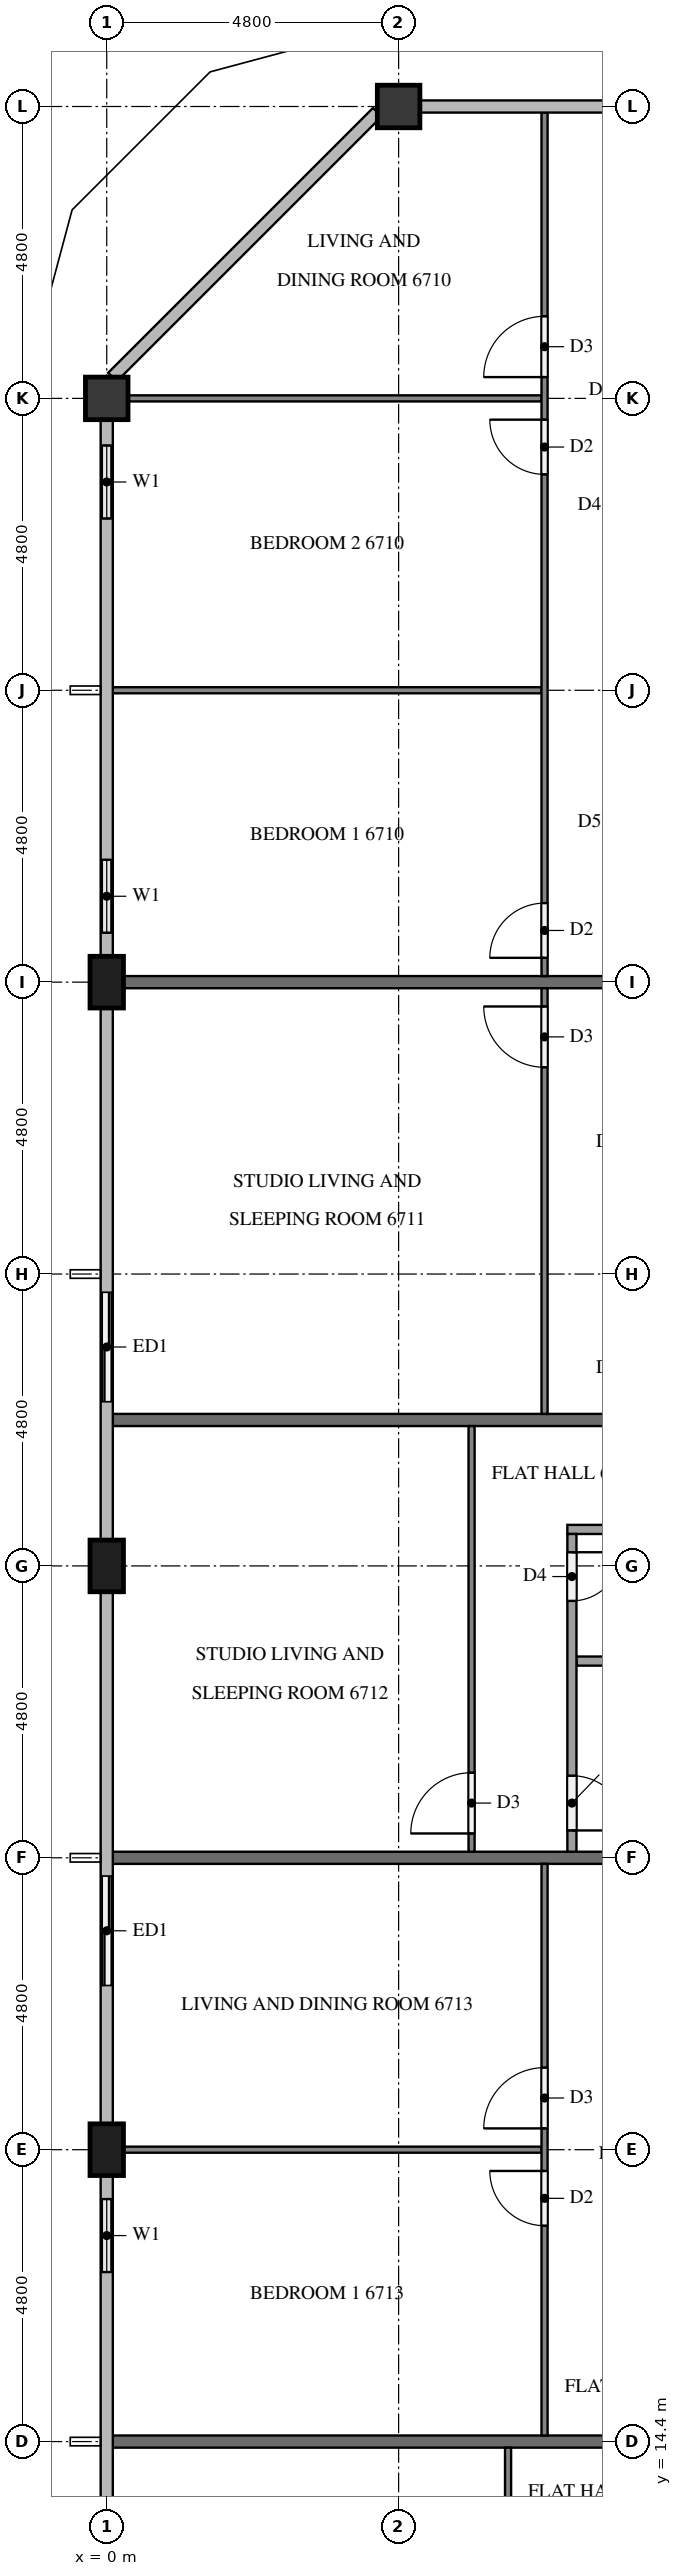
"""IFC4 building model, lengths in metres.
Left out: names, types, materials, properties, quantities, classifications, styles, units other than length and angle.
Written with IfcOpenShell. Run it as: python <this file> out.ifc"""

import sys

from ifc_helpers import new_model, si_unit, direction, frame, frame_2d, origin, origin_2d, place, context, subcontext, project, spatial, rectangle, extrude, element, fill, save


model = new_model("IFC4")
c1 = context("Model", 3, precision=1e-05, world=origin(), true_north=direction((0.0, 1.0)))
c2 = subcontext(c1, "Body", "Model", "MODEL_VIEW")
j1 = project(units=[si_unit("LENGTHUNIT", "METRE"), si_unit("PLANEANGLEUNIT", "RADIAN")], contexts=[c1])
p1 = place(None, origin())
s1 = spatial("IfcSite", under=j1, at=p1, CompositionType="ELEMENT")
p2 = place(p1, origin())
s2 = spatial("IfcBuilding", under=s1, at=p2, CompositionType="ELEMENT")
p3 = place(p2, frame((0.0, 0.0, 256.2)))
s3 = spatial("IfcBuildingStorey", under=s2, at=p3, CompositionType="ELEMENT", Elevation=256.2)
for number, where, z_axis, x_axis in (
    (1, (4.8, 52.8, 0.0), (0.0, 0.0, 1.0), (1.0, 0.0, 0.0)),
    (2, (0.0, 48.0, 0.0), (0.0, 0.0, 1.0), (1.0, 0.0, 0.0)),
):
    element("IfcColumn", number, at=place(p3, frame(where, z_axis=z_axis, x_axis=x_axis)), inside=s3, PredefinedType="COLUMN", context=c2, shape_type="SweptSolid", body=[
        extrude(rectangle(XDim=0.7, YDim=0.7, at=origin_2d()), origin(), (0.0, 0.0, 1.0), 3.2),
    ])
for number, where, z_axis, x_axis in (
    (3, (0.0, 38.4, 0.0), (0.0, 0.0, 1.0), (0.0, 1.0, 0.0)),
    (4, (0.0, 28.8, 0.0), (0.0, 0.0, 1.0), (0.0, 1.0, 0.0)),
    (5, (0.0, 19.2, 0.0), (0.0, 0.0, 1.0), (0.0, 1.0, 0.0)),
):
    element("IfcColumn", number, at=place(p3, frame(where, z_axis=z_axis, x_axis=x_axis)), inside=s3, PredefinedType="COLUMN", context=c2, shape_type="SweptSolid", body=[
        extrude(rectangle(XDim=0.85, YDim=0.55, at=origin_2d()), origin(), (0.0, 0.0, 1.0), 3.2),
    ])
p4 = place(p3, frame((0.0, 47.65, 0.0), z_axis=(0.0, 0.0, 1.0), x_axis=(0.0, -1.0, 0.0)))
e6 = element("IfcWall", 6, at=p4, inside=s3, PredefinedType="SOLIDWALL", context=c2, shape_type="SweptSolid", body=[
    extrude(rectangle(XDim=2.05, YDim=0.15, at=frame_2d((1.025, 0.0))), origin(), (0.0, 0.0, 1.0), 3.2),
])
p5 = place(p4, frame((0.425, 0.0, 0.9)))
e7 = element("IfcOpeningElement", 7, at=p5, cuts=e6, PredefinedType="OPENING", context=c2, shape_type="SweptSolid", body=[
    extrude(rectangle(XDim=1.2, YDim=1.4, at=frame_2d((0.6, 0.7))), frame((0.0, 0.085, 0.0), z_axis=(0.0, -1.0, 0.0), x_axis=(1.0, 0.0, 0.0)), (0.0, 0.0, 1.0), 0.17),
])
p6 = place(p3, frame((0.0, 40.8, 0.0), z_axis=(0.0, 0.0, 1.0), x_axis=(0.0, -1.0, 0.0)))
e8 = element("IfcWall", 8, at=p6, inside=s3, PredefinedType="SOLIDWALL", context=c2, shape_type="SweptSolid", body=[
    extrude(rectangle(XDim=1.975, YDim=0.15, at=frame_2d((0.988, 0.0))), origin(), (0.0, 0.0, 1.0), 3.2),
])
p7 = place(p6, frame((0.387, 0.0, 0.9)))
e9 = element("IfcOpeningElement", 9, at=p7, cuts=e8, PredefinedType="OPENING", context=c2, shape_type="SweptSolid", body=[
    extrude(rectangle(XDim=1.2, YDim=1.4, at=frame_2d((0.6, 0.7))), frame((0.0, 0.085, 0.0), z_axis=(0.0, -1.0, 0.0), x_axis=(1.0, 0.0, 0.0)), (0.0, 0.0, 1.0), 0.17),
])
p8 = place(p3, frame((0.0, 33.6, 0.0), z_axis=(0.0, 0.0, 1.0), x_axis=(0.0, -1.0, 0.0)))
e10 = element("IfcWall", 10, at=p8, inside=s3, PredefinedType="SOLIDWALL", context=c2, shape_type="SweptSolid", body=[
    extrude(rectangle(XDim=2.4, YDim=0.15, at=frame_2d((1.2, 0.0))), origin(), (0.0, 0.0, 1.0), 3.2),
])
p9 = place(p8, frame((0.3, 0.0, 0.0)))
e11 = element("IfcOpeningElement", 11, at=p9, cuts=e10, PredefinedType="OPENING", context=c2, shape_type="SweptSolid", body=[
    extrude(rectangle(XDim=1.8, YDim=2.4, at=frame_2d((0.9, 1.2))), frame((0.0, 0.085, 0.0), z_axis=(0.0, -1.0, 0.0), x_axis=(1.0, 0.0, 0.0)), (0.0, 0.0, 1.0), 0.17),
])
p10 = place(p3, frame((0.0, 24.0, 0.0), z_axis=(0.0, 0.0, 1.0), x_axis=(0.0, -1.0, 0.0)))
e12 = element("IfcWall", 12, at=p10, inside=s3, PredefinedType="SOLIDWALL", context=c2, shape_type="SweptSolid", body=[
    extrude(rectangle(XDim=2.4, YDim=0.15, at=frame_2d((1.2, 0.0))), origin(), (0.0, 0.0, 1.0), 3.2),
])
p11 = place(p10, frame((0.3, 0.0, 0.0)))
e13 = element("IfcOpeningElement", 13, at=p11, cuts=e12, PredefinedType="OPENING", context=c2, shape_type="SweptSolid", body=[
    extrude(rectangle(XDim=1.8, YDim=2.4, at=frame_2d((0.9, 1.2))), frame((0.0, 0.085, 0.0), z_axis=(0.0, -1.0, 0.0), x_axis=(1.0, 0.0, 0.0)), (0.0, 0.0, 1.0), 0.17),
])
p12 = place(p3, frame((0.0, 18.775, 0.0), z_axis=(0.0, 0.0, 1.0), x_axis=(0.0, -1.0, 0.0)))
e14 = element("IfcWall", 14, at=p12, inside=s3, PredefinedType="SOLIDWALL", context=c2, shape_type="SweptSolid", body=[
    extrude(rectangle(XDim=1.975, YDim=0.15, at=frame_2d((0.987, 0.0))), origin(), (0.0, 0.0, 1.0), 3.2),
])
p13 = place(p12, frame((0.387, 0.0, 0.9)))
e15 = element("IfcOpeningElement", 15, at=p13, cuts=e14, PredefinedType="OPENING", context=c2, shape_type="SweptSolid", body=[
    extrude(rectangle(XDim=1.2, YDim=1.4, at=frame_2d((0.6, 0.7))), frame((0.0, 0.085, 0.0), z_axis=(0.0, -1.0, 0.0), x_axis=(1.0, 0.0, 0.0)), (0.0, 0.0, 1.0), 0.17),
])
p14 = place(p3, frame((0.275, 38.4, 0.0), z_axis=(0.0, 0.0, 1.0), x_axis=(1.0, 0.0, 0.0)))
e16 = element("IfcWall", 16, at=p14, inside=s3, PredefinedType="PARTITIONING", context=c2, shape_type="SweptSolid", body=[
    extrude(rectangle(XDim=11.625, YDim=0.2, at=frame_2d((5.812, 0.0))), origin(), (0.0, 0.0, 1.0), 3.2),
])
for number, where, z_axis, x_axis in (
    (17, (0.1, 31.2, 0.0), (0.0, 0.0, 1.0), (1.0, 0.0, 0.0)),
    (18, (0.1, 24.0, 0.0), (0.0, 0.0, 1.0), (1.0, 0.0, 0.0)),
    (19, (0.1, 14.4, 0.0), (0.0, 0.0, 1.0), (1.0, 0.0, 0.0)),
):
    element("IfcWall", number, at=place(p3, frame(where, z_axis=z_axis, x_axis=x_axis)), inside=s3, PredefinedType="PARTITIONING", context=c2, shape_type="SweptSolid", body=[
        extrude(rectangle(XDim=11.8, YDim=0.2, at=frame_2d((5.9, 0.0))), origin(), (0.0, 0.0, 1.0), 3.2),
    ])
p15 = place(p3, frame((7.15, 43.2, 0.0), z_axis=(0.0, 0.0, 1.0), x_axis=(-1.0, 0.0, 0.0)))
e20 = element("IfcWall", 20, at=p15, inside=s3, PredefinedType="PARTITIONING", context=c2, shape_type="SweptSolid", body=[
    extrude(rectangle(XDim=7.05, YDim=0.1, at=frame_2d((3.525, 0.0))), origin(), (0.0, 0.0, 1.0), 3.2),
])
p16 = place(p3, frame((7.15, 48.0, 0.0), z_axis=(0.0, 0.0, 1.0), x_axis=(-1.0, 0.0, 0.0)))
e21 = element("IfcWall", 21, at=p16, inside=s3, PredefinedType="PARTITIONING", context=c2, shape_type="SweptSolid", body=[
    extrude(rectangle(XDim=6.8, YDim=0.1, at=frame_2d((3.4, 0.0))), origin(), (0.0, 0.0, 1.0), 3.2),
])
p17 = place(p3, frame((7.2, 38.5, 0.0), z_axis=(0.0, 0.0, 1.0), x_axis=(0.0, 1.0, 0.0)))
e22 = element("IfcWall", 22, at=p17, inside=s3, PredefinedType="PARTITIONING", context=c2, shape_type="SweptSolid", body=[
    extrude(rectangle(XDim=14.2, YDim=0.1, at=frame_2d((7.1, 0.0))), origin(), (0.0, 0.0, 1.0), 3.2),
])
p18 = place(p17, frame((0.3, 0.0, 0.0)))
e23 = element("IfcOpeningElement", 23, at=p18, cuts=e22, PredefinedType="OPENING", context=c2, shape_type="SweptSolid", body=[
    extrude(rectangle(XDim=0.9, YDim=2.1, at=frame_2d((0.45, 1.05))), frame((0.0, 0.06, 0.0), z_axis=(0.0, -1.0, 0.0), x_axis=(1.0, 0.0, 0.0)), (0.0, 0.0, 1.0), 0.12),
])
p19 = place(p17, frame((8.25, 0.0, 0.0)))
e24 = element("IfcOpeningElement", 24, at=p19, cuts=e22, PredefinedType="OPENING", context=c2, shape_type="SweptSolid", body=[
    extrude(rectangle(XDim=0.9, YDim=2.1, at=frame_2d((0.45, 1.05))), frame((0.0, 0.06, 0.0), z_axis=(0.0, -1.0, 0.0), x_axis=(1.0, 0.0, 0.0)), (0.0, 0.0, 1.0), 0.12),
])
p20 = place(p17, frame((9.85, 0.0, 0.0)))
e25 = element("IfcOpeningElement", 25, at=p20, cuts=e22, PredefinedType="OPENING", context=c2, shape_type="SweptSolid", body=[
    extrude(rectangle(XDim=1.0, YDim=2.1, at=frame_2d((0.5, 1.05))), frame((0.0, 0.06, 0.0), z_axis=(0.0, -1.0, 0.0), x_axis=(1.0, 0.0, 0.0)), (0.0, 0.0, 1.0), 0.12),
])
p21 = place(p3, frame((7.2, 31.3, 0.0), z_axis=(0.0, 0.0, 1.0), x_axis=(0.0, 1.0, 0.0)))
e26 = element("IfcWall", 26, at=p21, inside=s3, PredefinedType="PARTITIONING", context=c2, shape_type="SweptSolid", body=[
    extrude(rectangle(XDim=7.0, YDim=0.1, at=frame_2d((3.5, 0.0))), origin(), (0.0, 0.0, 1.0), 3.2),
])
p22 = place(p21, frame((5.7, 0.0, 0.0)))
e27 = element("IfcOpeningElement", 27, at=p22, cuts=e26, PredefinedType="OPENING", context=c2, shape_type="SweptSolid", body=[
    extrude(rectangle(XDim=1.0, YDim=2.1, at=frame_2d((0.5, 1.05))), frame((0.0, 0.06, 0.0), z_axis=(0.0, -1.0, 0.0), x_axis=(1.0, 0.0, 0.0)), (0.0, 0.0, 1.0), 0.12),
])
p23 = place(p3, frame((6.0, 24.1, 0.0), z_axis=(0.0, 0.0, 1.0), x_axis=(0.0, 1.0, 0.0)))
e28 = element("IfcWall", 28, at=p23, inside=s3, PredefinedType="PARTITIONING", context=c2, shape_type="SweptSolid", body=[
    extrude(rectangle(XDim=7.0, YDim=0.1, at=frame_2d((3.5, 0.0))), origin(), (0.0, 0.0, 1.0), 3.2),
])
p24 = place(p23, frame((0.3, 0.0, 0.0)))
e29 = element("IfcOpeningElement", 29, at=p24, cuts=e28, PredefinedType="OPENING", context=c2, shape_type="SweptSolid", body=[
    extrude(rectangle(XDim=1.0, YDim=2.1, at=frame_2d((0.5, 1.05))), frame((0.0, 0.06, 0.0), z_axis=(0.0, -1.0, 0.0), x_axis=(1.0, 0.0, 0.0)), (0.0, 0.0, 1.0), 0.12),
])
p25 = place(p3, frame((11.9, 27.235, 0.0), z_axis=(0.0, 0.0, 1.0), x_axis=(-1.0, 0.0, 0.0)))
e30 = element("IfcWall", 30, at=p25, inside=s3, PredefinedType="PARTITIONING", context=c2, shape_type="SweptSolid", body=[
    extrude(rectangle(XDim=4.175, YDim=0.15, at=frame_2d((2.087, 0.0))), origin(), (0.0, 0.0, 1.0), 3.2),
])
p26 = place(p3, frame((11.9, 29.4, 0.0), z_axis=(0.0, 0.0, 1.0), x_axis=(-1.0, 0.0, 0.0)))
e31 = element("IfcWall", 31, at=p26, inside=s3, PredefinedType="PARTITIONING", context=c2, shape_type="SweptSolid", body=[
    extrude(rectangle(XDim=4.325, YDim=0.15, at=frame_2d((2.163, 0.0))), origin(), (0.0, 0.0, 1.0), 3.2),
])
p27 = place(p3, frame((7.65, 29.325, 0.0), z_axis=(0.0, 0.0, 1.0), x_axis=(0.0, -1.0, 0.0)))
e32 = element("IfcWall", 32, at=p27, inside=s3, PredefinedType="PARTITIONING", context=c2, shape_type="SweptSolid", body=[
    extrude(rectangle(XDim=5.225, YDim=0.15, at=frame_2d((2.612, 0.0))), origin(), (0.0, 0.0, 1.0), 3.2),
])
p28 = place(p27, frame((0.3, 0.0, 0.0)))
e33 = element("IfcOpeningElement", 33, at=p28, cuts=e32, PredefinedType="OPENING", context=c2, shape_type="SweptSolid", body=[
    extrude(rectangle(XDim=0.8, YDim=2.1, at=frame_2d((0.4, 1.05))), frame((0.0, 0.085, 0.0), z_axis=(0.0, -1.0, 0.0), x_axis=(1.0, 0.0, 0.0)), (0.0, 0.0, 1.0), 0.17),
])
p29 = place(p27, frame((3.975, 0.0, 0.0)))
e34 = element("IfcOpeningElement", 34, at=p29, cuts=e32, PredefinedType="OPENING", context=c2, shape_type="SweptSolid", body=[
    extrude(rectangle(XDim=0.9, YDim=2.1, at=frame_2d((0.45, 1.05))), frame((0.0, 0.085, 0.0), z_axis=(0.0, -1.0, 0.0), x_axis=(1.0, 0.0, 0.0)), (0.0, 0.0, 1.0), 0.17),
])
p30 = place(p3, frame((7.15, 19.2, 0.0), z_axis=(0.0, 0.0, 1.0), x_axis=(-1.0, 0.0, 0.0)))
e35 = element("IfcWall", 35, at=p30, inside=s3, PredefinedType="PARTITIONING", context=c2, shape_type="SweptSolid", body=[
    extrude(rectangle(XDim=6.875, YDim=0.1, at=frame_2d((3.438, 0.0))), origin(), (0.0, 0.0, 1.0), 3.2),
])
p31 = place(p3, frame((7.2, 14.5, 0.0), z_axis=(0.0, 0.0, 1.0), x_axis=(0.0, 1.0, 0.0)))
e36 = element("IfcWall", 36, at=p31, inside=s3, PredefinedType="PARTITIONING", context=c2, shape_type="SweptSolid", body=[
    extrude(rectangle(XDim=9.4, YDim=0.1, at=frame_2d((4.7, 0.0))), origin(), (0.0, 0.0, 1.0), 3.2),
])
p32 = place(p31, frame((3.45, 0.0, 0.0)))
e37 = element("IfcOpeningElement", 37, at=p32, cuts=e36, PredefinedType="OPENING", context=c2, shape_type="SweptSolid", body=[
    extrude(rectangle(XDim=0.9, YDim=2.1, at=frame_2d((0.45, 1.05))), frame((0.0, 0.06, 0.0), z_axis=(0.0, -1.0, 0.0), x_axis=(1.0, 0.0, 0.0)), (0.0, 0.0, 1.0), 0.12),
])
p33 = place(p31, frame((5.05, 0.0, 0.0)))
e38 = element("IfcOpeningElement", 38, at=p33, cuts=e36, PredefinedType="OPENING", context=c2, shape_type="SweptSolid", body=[
    extrude(rectangle(XDim=1.0, YDim=2.1, at=frame_2d((0.5, 1.05))), frame((0.0, 0.06, 0.0), z_axis=(0.0, -1.0, 0.0), x_axis=(1.0, 0.0, 0.0)), (0.0, 0.0, 1.0), 0.12),
])
p34 = place(p3, frame((6.6, 4.9, 0.0), z_axis=(0.0, 0.0, 1.0), x_axis=(0.0, 1.0, 0.0)))
e39 = element("IfcWall", 39, at=p34, inside=s3, PredefinedType="PARTITIONING", context=c2, shape_type="SweptSolid", body=[
    extrude(rectangle(XDim=9.4, YDim=0.1, at=frame_2d((4.7, 0.0))), origin(), (0.0, 0.0, 1.0), 3.2),
])
p35 = place(p34, frame((5.05, 0.0, 0.0)))
e40 = element("IfcOpeningElement", 40, at=p35, cuts=e39, PredefinedType="OPENING", context=c2, shape_type="SweptSolid", body=[
    extrude(rectangle(XDim=0.9, YDim=2.1, at=frame_2d((0.45, 1.05))), frame((0.0, 0.06, 0.0), z_axis=(0.0, -1.0, 0.0), x_axis=(1.0, 0.0, 0.0)), (0.0, 0.0, 1.0), 0.12),
])
p36 = place(p34, frame((3.35, 0.0, 0.0)))
e41 = element("IfcOpeningElement", 41, at=p36, cuts=e39, PredefinedType="OPENING", context=c2, shape_type="SweptSolid", body=[
    extrude(rectangle(XDim=1.0, YDim=2.1, at=frame_2d((0.5, 1.05))), frame((0.0, 0.06, 0.0), z_axis=(0.0, -1.0, 0.0), x_axis=(1.0, 0.0, 0.0)), (0.0, 0.0, 1.0), 0.12),
])
p37 = place(p5, origin())
e42 = element("IfcWindow", 42, at=p37, inside=s3, PartitioningType="SINGLE_PANEL", PredefinedType="WINDOW", context=c2, shape_type="SweptSolid", body=[
    extrude(rectangle(XDim=1.2, YDim=1.4, at=frame_2d((0.6, 0.7))), frame((0.0, 0.03, 0.0), z_axis=(0.0, -1.0, 0.0), x_axis=(1.0, 0.0, 0.0)), (0.0, 0.0, 1.0), 0.06),
])
fill(e7, e42)
p38 = place(p7, origin())
e43 = element("IfcWindow", 43, at=p38, inside=s3, PartitioningType="SINGLE_PANEL", PredefinedType="WINDOW", context=c2, shape_type="SweptSolid", body=[
    extrude(rectangle(XDim=1.2, YDim=1.4, at=frame_2d((0.6, 0.7))), frame((0.0, 0.03, 0.0), z_axis=(0.0, -1.0, 0.0), x_axis=(1.0, 0.0, 0.0)), (0.0, 0.0, 1.0), 0.06),
])
fill(e9, e43)
p39 = place(p9, origin())
e44 = element("IfcDoor", 44, at=p39, inside=s3, OperationType="SLIDING_TO_RIGHT", PredefinedType="DOOR", context=c2, shape_type="SweptSolid", body=[
    extrude(rectangle(XDim=1.8, YDim=2.4, at=frame_2d((0.9, 1.2))), frame((0.0, 0.025, 0.0), z_axis=(0.0, -1.0, 0.0), x_axis=(1.0, 0.0, 0.0)), (0.0, 0.0, 1.0), 0.05),
])
fill(e11, e44)
p40 = place(p11, origin())
e45 = element("IfcDoor", 45, at=p40, inside=s3, OperationType="SLIDING_TO_LEFT", PredefinedType="DOOR", context=c2, shape_type="SweptSolid", body=[
    extrude(rectangle(XDim=1.8, YDim=2.4, at=frame_2d((0.9, 1.2))), frame((0.0, 0.025, 0.0), z_axis=(0.0, -1.0, 0.0), x_axis=(1.0, 0.0, 0.0)), (0.0, 0.0, 1.0), 0.05),
])
fill(e13, e45)
p41 = place(p13, origin())
e46 = element("IfcWindow", 46, at=p41, inside=s3, PartitioningType="SINGLE_PANEL", PredefinedType="WINDOW", context=c2, shape_type="SweptSolid", body=[
    extrude(rectangle(XDim=1.2, YDim=1.4, at=frame_2d((0.6, 0.7))), frame((0.0, 0.03, 0.0), z_axis=(0.0, -1.0, 0.0), x_axis=(1.0, 0.0, 0.0)), (0.0, 0.0, 1.0), 0.06),
])
fill(e15, e46)
p42 = place(p18, origin())
e47 = element("IfcDoor", 47, at=p42, inside=s3, OperationType="SINGLE_SWING_LEFT", PredefinedType="DOOR", context=c2, shape_type="SweptSolid", body=[
    extrude(rectangle(XDim=0.9, YDim=2.1, at=frame_2d((0.45, 1.05))), frame((0.0, 0.025, 0.0), z_axis=(0.0, -1.0, 0.0), x_axis=(1.0, 0.0, 0.0)), (0.0, 0.0, 1.0), 0.05),
])
fill(e23, e47)
p43 = place(p19, origin())
e48 = element("IfcDoor", 48, at=p43, inside=s3, OperationType="SINGLE_SWING_RIGHT", PredefinedType="DOOR", context=c2, shape_type="SweptSolid", body=[
    extrude(rectangle(XDim=0.9, YDim=2.1, at=frame_2d((0.45, 1.05))), frame((0.0, 0.025, 0.0), z_axis=(0.0, -1.0, 0.0), x_axis=(1.0, 0.0, 0.0)), (0.0, 0.0, 1.0), 0.05),
])
fill(e24, e48)
p44 = place(p20, origin())
e49 = element("IfcDoor", 49, at=p44, inside=s3, OperationType="SINGLE_SWING_LEFT", PredefinedType="DOOR", context=c2, shape_type="SweptSolid", body=[
    extrude(rectangle(XDim=1.0, YDim=2.1, at=frame_2d((0.5, 1.05))), frame((0.0, 0.025, 0.0), z_axis=(0.0, -1.0, 0.0), x_axis=(1.0, 0.0, 0.0)), (0.0, 0.0, 1.0), 0.05),
])
fill(e25, e49)
p45 = place(p22, origin())
e50 = element("IfcDoor", 50, at=p45, inside=s3, OperationType="SINGLE_SWING_RIGHT", PredefinedType="DOOR", context=c2, shape_type="SweptSolid", body=[
    extrude(rectangle(XDim=1.0, YDim=2.1, at=frame_2d((0.5, 1.05))), frame((0.0, 0.025, 0.0), z_axis=(0.0, -1.0, 0.0), x_axis=(1.0, 0.0, 0.0)), (0.0, 0.0, 1.0), 0.05),
])
fill(e27, e50)
p46 = place(p24, origin())
e51 = element("IfcDoor", 51, at=p46, inside=s3, OperationType="SINGLE_SWING_LEFT", PredefinedType="DOOR", context=c2, shape_type="SweptSolid", body=[
    extrude(rectangle(XDim=1.0, YDim=2.1, at=frame_2d((0.5, 1.05))), frame((0.0, 0.025, 0.0), z_axis=(0.0, -1.0, 0.0), x_axis=(1.0, 0.0, 0.0)), (0.0, 0.0, 1.0), 0.05),
])
fill(e29, e51)
p47 = place(p28, origin())
e52 = element("IfcDoor", 52, at=p47, inside=s3, OperationType="SINGLE_SWING_LEFT", PredefinedType="DOOR", context=c2, shape_type="SweptSolid", body=[
    extrude(rectangle(XDim=0.8, YDim=2.1, at=frame_2d((0.4, 1.05))), frame((0.0, 0.025, 0.0), z_axis=(0.0, -1.0, 0.0), x_axis=(1.0, 0.0, 0.0)), (0.0, 0.0, 1.0), 0.05),
])
fill(e33, e52)
p48 = place(p29, origin())
e53 = element("IfcDoor", 53, at=p48, inside=s3, OperationType="SINGLE_SWING_RIGHT", PredefinedType="DOOR", context=c2, shape_type="SweptSolid", body=[
    extrude(rectangle(XDim=0.9, YDim=2.1, at=frame_2d((0.45, 1.05))), frame((0.0, 0.025, 0.0), z_axis=(0.0, -1.0, 0.0), x_axis=(1.0, 0.0, 0.0)), (0.0, 0.0, 1.0), 0.05),
])
fill(e34, e53)
p49 = place(p32, origin())
e54 = element("IfcDoor", 54, at=p49, inside=s3, OperationType="SINGLE_SWING_RIGHT", PredefinedType="DOOR", context=c2, shape_type="SweptSolid", body=[
    extrude(rectangle(XDim=0.9, YDim=2.1, at=frame_2d((0.45, 1.05))), frame((0.0, 0.025, 0.0), z_axis=(0.0, -1.0, 0.0), x_axis=(1.0, 0.0, 0.0)), (0.0, 0.0, 1.0), 0.05),
])
fill(e37, e54)
p50 = place(p33, origin())
e55 = element("IfcDoor", 55, at=p50, inside=s3, OperationType="SINGLE_SWING_LEFT", PredefinedType="DOOR", context=c2, shape_type="SweptSolid", body=[
    extrude(rectangle(XDim=1.0, YDim=2.1, at=frame_2d((0.5, 1.05))), frame((0.0, 0.025, 0.0), z_axis=(0.0, -1.0, 0.0), x_axis=(1.0, 0.0, 0.0)), (0.0, 0.0, 1.0), 0.05),
])
fill(e38, e55)
save(model, sys.argv[1])
